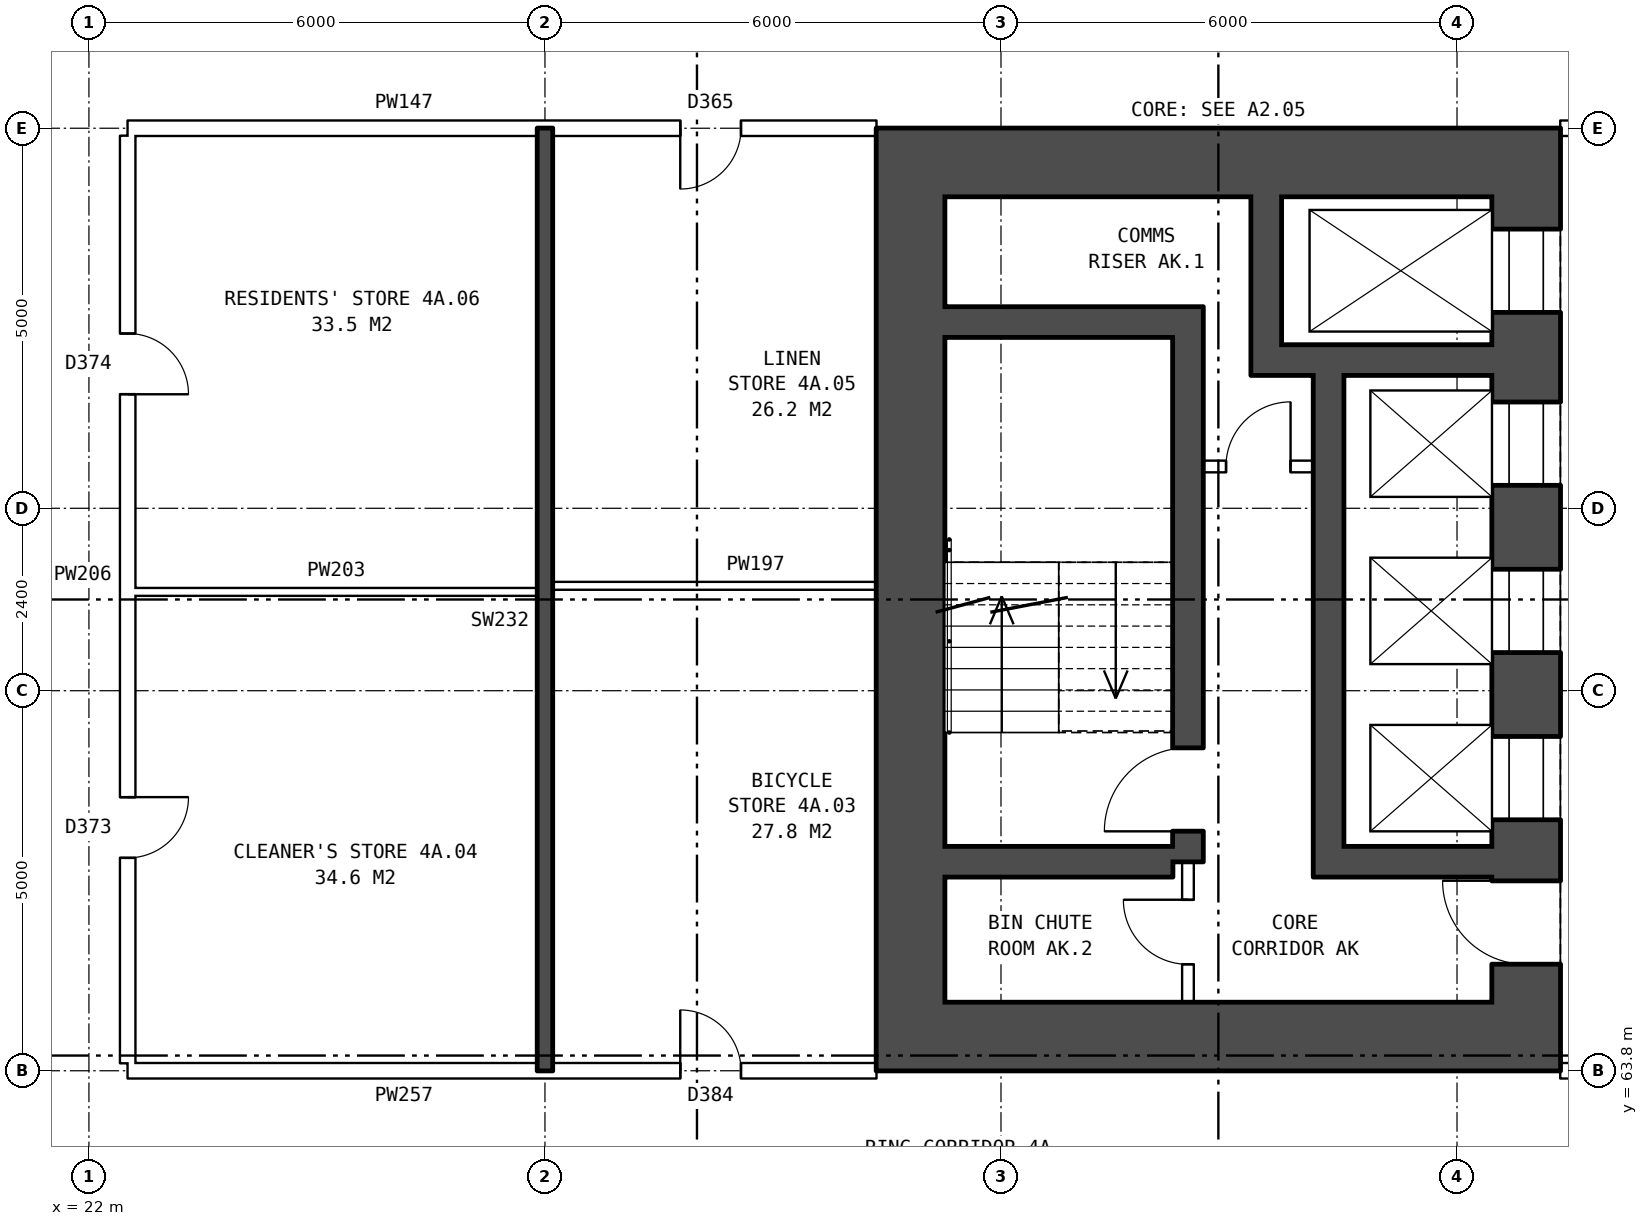
"""IFC4 building model, lengths in metres.
Left out: names, types, materials, properties, quantities, classifications, styles, units other than length and angle.
Written with IfcOpenShell. Run it as: python <this file> out.ifc"""

import sys

from ifc_helpers import new_model, si_unit, direction, frame, frame_2d, origin, place, context, subcontext, project, spatial, rectangle, extrude, element, fill, save


model = new_model("IFC4")
c1 = context("Model", 3, precision=1e-05, world=origin(), true_north=direction((0.0, 1.0)))
c2 = subcontext(c1, "Body", "Model", "MODEL_VIEW")
j1 = project(units=[si_unit("LENGTHUNIT", "METRE"), si_unit("PLANEANGLEUNIT", "RADIAN")], contexts=[c1])
p1 = place(None, origin())
s1 = spatial("IfcSite", under=j1, at=p1, CompositionType="ELEMENT")
p2 = place(p1, origin())
s2 = spatial("IfcBuilding", under=s1, at=p2, CompositionType="ELEMENT")
p3 = place(p2, frame((0.0, 0.0, 19.5)))
s3 = spatial("IfcBuildingStorey", under=s2, at=p3, CompositionType="ELEMENT", Elevation=19.5)
p4 = place(p3, frame((40.91, 75.3, 0.0), z_axis=(0.0, 0.0, 1.0), x_axis=(0.0, -1.0, 0.0)))
e1 = element("IfcWall", 1, at=p4, inside=s3, PredefinedType="SHEAR", context=c2, shape_type="SweptSolid", body=[
    extrude(rectangle(XDim=10.6, YDim=0.9, at=frame_2d((5.3, 0.0))), origin(), (0.0, 0.0, 1.0), 2.85),
])
p5 = place(p4, frame((0.425, 0.0, 0.0)))
e2 = element("IfcOpeningElement", 2, at=p5, cuts=e1, PredefinedType="OPENING", context=c2, shape_type="SweptSolid", body=[
    extrude(rectangle(XDim=1.1, YDim=2.1, at=frame_2d((0.55, 1.05))), frame((0.0, 0.46, 0.0), z_axis=(0.0, -1.0, 0.0), x_axis=(1.0, 0.0, 0.0)), (0.0, 0.0, 1.0), 0.92),
])
p6 = place(p4, frame((2.7, 0.0, 0.0)))
e3 = element("IfcOpeningElement", 3, at=p6, cuts=e1, PredefinedType="OPENING", context=c2, shape_type="SweptSolid", body=[
    extrude(rectangle(XDim=1.1, YDim=2.1, at=frame_2d((0.55, 1.05))), frame((0.0, 0.46, 0.0), z_axis=(0.0, -1.0, 0.0), x_axis=(1.0, 0.0, 0.0)), (0.0, 0.0, 1.0), 0.92),
])
p7 = place(p4, frame((4.9, 0.0, 0.0)))
e4 = element("IfcOpeningElement", 4, at=p7, cuts=e1, PredefinedType="OPENING", context=c2, shape_type="SweptSolid", body=[
    extrude(rectangle(XDim=1.1, YDim=2.1, at=frame_2d((0.55, 1.05))), frame((0.0, 0.46, 0.0), z_axis=(0.0, -1.0, 0.0), x_axis=(1.0, 0.0, 0.0)), (0.0, 0.0, 1.0), 0.92),
])
p8 = place(p4, frame((7.1, 0.0, 0.0)))
e5 = element("IfcOpeningElement", 5, at=p8, cuts=e1, PredefinedType="OPENING", context=c2, shape_type="SweptSolid", body=[
    extrude(rectangle(XDim=1.1, YDim=2.1, at=frame_2d((0.55, 1.05))), frame((0.0, 0.46, 0.0), z_axis=(0.0, -1.0, 0.0), x_axis=(1.0, 0.0, 0.0)), (0.0, 0.0, 1.0), 0.92),
])
p9 = place(p4, frame((9.0, 0.0, 0.0)))
e6 = element("IfcOpeningElement", 6, at=p9, cuts=e1, PredefinedType="OPENING", context=c2, shape_type="SweptSolid", body=[
    extrude(rectangle(XDim=1.1, YDim=2.1, at=frame_2d((0.55, 1.05))), frame((0.0, 0.46, 0.0), z_axis=(0.0, -1.0, 0.0), x_axis=(1.0, 0.0, 0.0)), (0.0, 0.0, 1.0), 0.92),
])
p10 = place(p3, frame((32.81, 75.3, 0.0), z_axis=(0.0, 0.0, 1.0), x_axis=(0.0, -1.0, 0.0)))
e7 = element("IfcWall", 7, at=p10, inside=s3, PredefinedType="SHEAR", context=c2, shape_type="SweptSolid", body=[
    extrude(rectangle(XDim=10.6, YDim=0.9, at=frame_2d((5.3, 0.0))), origin(), (0.0, 0.0, 1.0), 2.85),
])
for number, where, z_axis, x_axis in (
    (8, (41.36, 75.75, 0.0), (0.0, 0.0, 1.0), (-1.0, 0.0, 0.0)),
    (9, (41.36, 64.25, 0.0), (0.0, 0.0, 1.0), (-1.0, 0.0, 0.0)),
):
    element("IfcWall", number, at=place(p3, frame(where, z_axis=z_axis, x_axis=x_axis)), inside=s3, PredefinedType="SHEAR", context=c2, shape_type="SweptSolid", body=[
        extrude(rectangle(XDim=9.0, YDim=0.9, at=frame_2d((4.5, 0.0))), origin(), (0.0, 0.0, 1.0), 2.85),
    ])
p11 = place(p3, frame((36.26, 73.65, 0.0), z_axis=(0.0, 0.0, 1.0), x_axis=(-1.0, 0.0, 0.0)))
e10 = element("IfcWall", 10, at=p11, inside=s3, PredefinedType="SHEAR", context=c2, shape_type="SweptSolid", body=[
    extrude(rectangle(XDim=3.0, YDim=0.4, at=frame_2d((1.5, 0.0))), origin(), (0.0, 0.0, 1.0), 2.85),
])
p12 = place(p3, frame((40.46, 73.15, 0.0), z_axis=(0.0, 0.0, 1.0), x_axis=(-1.0, 0.0, 0.0)))
e11 = element("IfcWall", 11, at=p12, inside=s3, PredefinedType="SHEAR", context=c2, shape_type="SweptSolid", body=[
    extrude(rectangle(XDim=3.17, YDim=0.4, at=frame_2d((1.585, 0.0))), origin(), (0.0, 0.0, 1.0), 2.85),
])
p13 = place(p3, frame((38.11, 71.75, 0.0), z_axis=(0.0, 0.0, 1.0), x_axis=(-1.0, 0.0, 0.0)))
e12 = element("IfcWall", 12, at=p13, inside=s3, PredefinedType="PARTITIONING", context=c2, shape_type="SweptSolid", body=[
    extrude(rectangle(XDim=1.45, YDim=0.15, at=frame_2d((0.725, 0.0))), origin(), (0.0, 0.0, 1.0), 2.85),
])
p14 = place(p13, frame((0.3, 0.0, 0.0)))
e13 = element("IfcOpeningElement", 13, at=p14, cuts=e12, PredefinedType="OPENING", context=c2, shape_type="SweptSolid", body=[
    extrude(rectangle(XDim=0.85, YDim=2.1, at=frame_2d((0.425, 1.05))), frame((0.0, 0.085, 0.0), z_axis=(0.0, -1.0, 0.0), x_axis=(1.0, 0.0, 0.0)), (0.0, 0.0, 1.0), 0.17),
])
p15 = place(p3, frame((40.46, 66.55, 0.0), z_axis=(0.0, 0.0, 1.0), x_axis=(-1.0, 0.0, 0.0)))
e14 = element("IfcWall", 14, at=p15, inside=s3, PredefinedType="SHEAR", context=c2, shape_type="SweptSolid", body=[
    extrude(rectangle(XDim=1.95, YDim=0.4, at=frame_2d((0.975, 0.0))), origin(), (0.0, 0.0, 1.0), 2.85),
])
p16 = place(p3, frame((36.26, 66.55, 0.0), z_axis=(0.0, 0.0, 1.0), x_axis=(-1.0, 0.0, 0.0)))
e15 = element("IfcWall", 15, at=p16, inside=s3, PredefinedType="SHEAR", context=c2, shape_type="SweptSolid", body=[
    extrude(rectangle(XDim=3.0, YDim=0.4, at=frame_2d((1.5, 0.0))), origin(), (0.0, 0.0, 1.0), 2.85),
])
p17 = place(p3, frame((38.31, 72.95, 0.0), z_axis=(0.0, 0.0, 1.0), x_axis=(0.0, -1.0, 0.0)))
e16 = element("IfcWall", 16, at=p17, inside=s3, PredefinedType="SHEAR", context=c2, shape_type="SweptSolid", body=[
    extrude(rectangle(XDim=6.6, YDim=0.4, at=frame_2d((3.3, 0.0))), origin(), (0.0, 0.0, 1.0), 2.85),
])
p18 = place(p3, frame((37.49, 75.3, 0.0), z_axis=(0.0, 0.0, 1.0), x_axis=(0.0, -1.0, 0.0)))
e17 = element("IfcWall", 17, at=p18, inside=s3, PredefinedType="SHEAR", context=c2, shape_type="SweptSolid", body=[
    extrude(rectangle(XDim=1.95, YDim=0.4, at=frame_2d((0.975, 0.0))), origin(), (0.0, 0.0, 1.0), 2.85),
])
p19 = place(p3, frame((36.46, 73.85, 0.0), z_axis=(0.0, 0.0, 1.0), x_axis=(0.0, -1.0, 0.0)))
e18 = element("IfcWall", 18, at=p19, inside=s3, PredefinedType="SHEAR", context=c2, shape_type="SweptSolid", body=[
    extrude(rectangle(XDim=7.3, YDim=0.4, at=frame_2d((3.65, 0.0))), origin(), (0.0, 0.0, 1.0), 2.85),
])
p20 = place(p19, frame((5.8, 0.0, 0.0)))
e19 = element("IfcOpeningElement", 19, at=p20, cuts=e18, PredefinedType="OPENING", context=c2, shape_type="SweptSolid", body=[
    extrude(rectangle(XDim=1.1, YDim=2.1, at=frame_2d((0.55, 1.05))), frame((0.0, 0.21, 0.0), z_axis=(0.0, -1.0, 0.0), x_axis=(1.0, 0.0, 0.0)), (0.0, 0.0, 1.0), 0.42),
])
p21 = place(p3, frame((36.46, 66.55, 0.0), z_axis=(0.0, 0.0, 1.0), x_axis=(0.0, -1.0, 0.0)))
e20 = element("IfcWall", 20, at=p21, inside=s3, PredefinedType="PARTITIONING", context=c2, shape_type="SweptSolid", body=[
    extrude(rectangle(XDim=1.85, YDim=0.15, at=frame_2d((0.925, 0.0))), origin(), (0.0, 0.0, 1.0), 2.85),
])
p22 = place(p21, frame((0.5, 0.0, 0.0)))
e21 = element("IfcOpeningElement", 21, at=p22, cuts=e20, PredefinedType="OPENING", context=c2, shape_type="SweptSolid", body=[
    extrude(rectangle(XDim=0.85, YDim=2.1, at=frame_2d((0.425, 1.05))), frame((0.0, 0.085, 0.0), z_axis=(0.0, -1.0, 0.0), x_axis=(1.0, 0.0, 0.0)), (0.0, 0.0, 1.0), 0.17),
])
p23 = place(p3, frame((22.51, 63.8, 0.0), z_axis=(0.0, 0.0, 1.0), x_axis=(1.0, 0.0, 0.0)))
e22 = element("IfcWall", 22, at=p23, inside=s3, PredefinedType="PARTITIONING", context=c2, shape_type="SweptSolid", body=[
    extrude(rectangle(XDim=9.85, YDim=0.2, at=frame_2d((4.925, 0.0))), origin(), (0.0, 0.0, 1.0), 2.85),
])
p24 = place(p23, frame((7.27, 0.0, 0.0)))
e23 = element("IfcOpeningElement", 23, at=p24, cuts=e22, PredefinedType="OPENING", context=c2, shape_type="SweptSolid", body=[
    extrude(rectangle(XDim=0.8, YDim=2.1, at=frame_2d((0.4, 1.05))), frame((0.0, 0.11, 0.0), z_axis=(0.0, -1.0, 0.0), x_axis=(1.0, 0.0, 0.0)), (0.0, 0.0, 1.0), 0.22),
])
p25 = place(p3, frame((41.36, 63.8, 0.0), z_axis=(0.0, 0.0, 1.0), x_axis=(1.0, 0.0, 0.0)))
e24 = element("IfcWall", 24, at=p25, inside=s3, PredefinedType="PARTITIONING", context=c2, shape_type="SweptSolid", body=[
    extrude(rectangle(XDim=3.0, YDim=0.2, at=frame_2d((1.5, 0.0))), origin(), (0.0, 0.0, 1.0), 2.85),
])
p26 = place(p25, frame((1.0, 0.0, 0.0)))
e25 = element("IfcOpeningElement", 25, at=p26, cuts=e24, PredefinedType="OPENING", context=c2, shape_type="SweptSolid", body=[
    extrude(rectangle(XDim=1.0, YDim=2.1, at=frame_2d((0.5, 1.05))), frame((0.0, 0.11, 0.0), z_axis=(0.0, -1.0, 0.0), x_axis=(1.0, 0.0, 0.0)), (0.0, 0.0, 1.0), 0.22),
])
p27 = place(p3, frame((22.61, 70.1, 0.0), z_axis=(0.0, 0.0, 1.0), x_axis=(1.0, 0.0, 0.0)))
e26 = element("IfcWall", 26, at=p27, inside=s3, PredefinedType="PARTITIONING", context=c2, shape_type="SweptSolid", body=[
    extrude(rectangle(XDim=5.29, YDim=0.1, at=frame_2d((2.645, 0.0))), origin(), (0.0, 0.0, 1.0), 2.85),
])
p28 = place(p3, frame((28.1, 70.18, 0.0), z_axis=(0.0, 0.0, 1.0), x_axis=(1.0, 0.0, 0.0)))
e27 = element("IfcWall", 27, at=p28, inside=s3, PredefinedType="PARTITIONING", context=c2, shape_type="SweptSolid", body=[
    extrude(rectangle(XDim=4.26, YDim=0.1, at=frame_2d((2.13, 0.0))), origin(), (0.0, 0.0, 1.0), 2.85),
])
p29 = place(p3, frame((22.51, 76.2, 0.0), z_axis=(0.0, 0.0, 1.0), x_axis=(1.0, 0.0, 0.0)))
e28 = element("IfcWall", 28, at=p29, inside=s3, PredefinedType="PARTITIONING", context=c2, shape_type="SweptSolid", body=[
    extrude(rectangle(XDim=9.85, YDim=0.2, at=frame_2d((4.925, 0.0))), origin(), (0.0, 0.0, 1.0), 2.85),
])
p30 = place(p29, frame((7.27, 0.0, 0.0)))
e29 = element("IfcOpeningElement", 29, at=p30, cuts=e28, PredefinedType="OPENING", context=c2, shape_type="SweptSolid", body=[
    extrude(rectangle(XDim=0.8, YDim=2.1, at=frame_2d((0.4, 1.05))), frame((0.0, 0.11, 0.0), z_axis=(0.0, -1.0, 0.0), x_axis=(1.0, 0.0, 0.0)), (0.0, 0.0, 1.0), 0.22),
])
p31 = place(p3, frame((41.36, 76.2, 0.0), z_axis=(0.0, 0.0, 1.0), x_axis=(1.0, 0.0, 0.0)))
e30 = element("IfcWall", 30, at=p31, inside=s3, PredefinedType="PARTITIONING", context=c2, shape_type="SweptSolid", body=[
    extrude(rectangle(XDim=3.0, YDim=0.2, at=frame_2d((1.5, 0.0))), origin(), (0.0, 0.0, 1.0), 2.85),
])
p32 = place(p31, frame((1.0, 0.0, 0.0)))
e31 = element("IfcOpeningElement", 31, at=p32, cuts=e30, PredefinedType="OPENING", context=c2, shape_type="SweptSolid", body=[
    extrude(rectangle(XDim=1.0, YDim=2.1, at=frame_2d((0.5, 1.05))), frame((0.0, 0.11, 0.0), z_axis=(0.0, -1.0, 0.0), x_axis=(1.0, 0.0, 0.0)), (0.0, 0.0, 1.0), 0.22),
])
p33 = place(p3, frame((22.51, 63.9, 0.0), z_axis=(0.0, 0.0, 1.0), x_axis=(0.0, 1.0, 0.0)))
e32 = element("IfcWall", 32, at=p33, inside=s3, PredefinedType="PARTITIONING", context=c2, shape_type="SweptSolid", body=[
    extrude(rectangle(XDim=12.2, YDim=0.2, at=frame_2d((6.1, 0.0))), origin(), (0.0, 0.0, 1.0), 2.85),
])
p34 = place(p33, frame((2.7, 0.0, 0.0)))
e33 = element("IfcOpeningElement", 33, at=p34, cuts=e32, PredefinedType="OPENING", context=c2, shape_type="SweptSolid", body=[
    extrude(rectangle(XDim=0.8, YDim=2.1, at=frame_2d((0.4, 1.05))), frame((0.0, 0.11, 0.0), z_axis=(0.0, -1.0, 0.0), x_axis=(1.0, 0.0, 0.0)), (0.0, 0.0, 1.0), 0.22),
])
p35 = place(p33, frame((8.8, 0.0, 0.0)))
e34 = element("IfcOpeningElement", 34, at=p35, cuts=e32, PredefinedType="OPENING", context=c2, shape_type="SweptSolid", body=[
    extrude(rectangle(XDim=0.8, YDim=2.1, at=frame_2d((0.4, 1.05))), frame((0.0, 0.11, 0.0), z_axis=(0.0, -1.0, 0.0), x_axis=(1.0, 0.0, 0.0)), (0.0, 0.0, 1.0), 0.22),
])
p36 = place(p3, frame((28.0, 63.8, 0.0), z_axis=(0.0, 0.0, 1.0), x_axis=(0.0, 1.0, 0.0)))
e35 = element("IfcWall", 35, at=p36, inside=s3, PredefinedType="SOLIDWALL", context=c2, shape_type="SweptSolid", body=[
    extrude(rectangle(XDim=12.4, YDim=0.2, at=frame_2d((6.2, 0.0))), origin(), (0.0, 0.0, 1.0), 2.85),
])
p37 = place(p5, origin())
e36 = element("IfcDoor", 36, at=p37, inside=s3, OperationType="DOUBLE_DOOR_SLIDING", PredefinedType="DOOR", context=c2, shape_type="SweptSolid", body=[
    extrude(rectangle(XDim=1.1, YDim=2.1, at=frame_2d((0.55, 1.05))), frame((0.0, -0.385, 0.0), z_axis=(0.0, -1.0, 0.0), x_axis=(1.0, 0.0, 0.0)), (0.0, 0.0, 1.0), 0.05),
])
fill(e2, e36)
p38 = place(p6, origin())
e37 = element("IfcDoor", 37, at=p38, inside=s3, OperationType="DOUBLE_DOOR_SLIDING", PredefinedType="DOOR", context=c2, shape_type="SweptSolid", body=[
    extrude(rectangle(XDim=1.1, YDim=2.1, at=frame_2d((0.55, 1.05))), frame((0.0, -0.385, 0.0), z_axis=(0.0, -1.0, 0.0), x_axis=(1.0, 0.0, 0.0)), (0.0, 0.0, 1.0), 0.05),
])
fill(e3, e37)
p39 = place(p7, origin())
e38 = element("IfcDoor", 38, at=p39, inside=s3, OperationType="DOUBLE_DOOR_SLIDING", PredefinedType="DOOR", context=c2, shape_type="SweptSolid", body=[
    extrude(rectangle(XDim=1.1, YDim=2.1, at=frame_2d((0.55, 1.05))), frame((0.0, -0.385, 0.0), z_axis=(0.0, -1.0, 0.0), x_axis=(1.0, 0.0, 0.0)), (0.0, 0.0, 1.0), 0.05),
])
fill(e4, e38)
p40 = place(p8, origin())
e39 = element("IfcDoor", 39, at=p40, inside=s3, OperationType="DOUBLE_DOOR_SLIDING", PredefinedType="DOOR", context=c2, shape_type="SweptSolid", body=[
    extrude(rectangle(XDim=1.1, YDim=2.1, at=frame_2d((0.55, 1.05))), frame((0.0, -0.385, 0.0), z_axis=(0.0, -1.0, 0.0), x_axis=(1.0, 0.0, 0.0)), (0.0, 0.0, 1.0), 0.05),
])
fill(e5, e39)
p41 = place(p9, frame((1.1, 0.0, 0.0), z_axis=(0.0, 0.0, 1.0), x_axis=(-1.0, 0.0, 0.0)))
e40 = element("IfcDoor", 40, at=p41, inside=s3, OperationType="SINGLE_SWING_RIGHT", PredefinedType="DOOR", context=c2, shape_type="SweptSolid", body=[
    extrude(rectangle(XDim=1.1, YDim=2.1, at=frame_2d((0.55, 1.05))), frame((0.0, 0.435, 0.0), z_axis=(0.0, -1.0, 0.0), x_axis=(1.0, 0.0, 0.0)), (0.0, 0.0, 1.0), 0.05),
])
fill(e6, e40)
p42 = place(p20, frame((1.1, 0.0, 0.0), z_axis=(0.0, 0.0, 1.0), x_axis=(-1.0, 0.0, 0.0)))
e41 = element("IfcDoor", 41, at=p42, inside=s3, OperationType="SINGLE_SWING_LEFT", PredefinedType="DOOR", context=c2, shape_type="SweptSolid", body=[
    extrude(rectangle(XDim=1.1, YDim=2.1, at=frame_2d((0.55, 1.05))), frame((0.0, 0.025, 0.0), z_axis=(0.0, -1.0, 0.0), x_axis=(1.0, 0.0, 0.0)), (0.0, 0.0, 1.0), 0.05),
])
fill(e19, e41)
p43 = place(p14, frame((0.85, 0.0, 0.0), z_axis=(0.0, 0.0, 1.0), x_axis=(-1.0, 0.0, 0.0)))
e42 = element("IfcDoor", 42, at=p43, inside=s3, OperationType="SINGLE_SWING_RIGHT", PredefinedType="DOOR", context=c2, shape_type="SweptSolid", body=[
    extrude(rectangle(XDim=0.85, YDim=2.1, at=frame_2d((0.425, 1.05))), frame((0.0, 0.025, 0.0), z_axis=(0.0, -1.0, 0.0), x_axis=(1.0, 0.0, 0.0)), (0.0, 0.0, 1.0), 0.05),
])
fill(e13, e42)
p44 = place(p22, frame((0.85, 0.0, 0.0), z_axis=(0.0, 0.0, 1.0), x_axis=(-1.0, 0.0, 0.0)))
e43 = element("IfcDoor", 43, at=p44, inside=s3, OperationType="SINGLE_SWING_RIGHT", PredefinedType="DOOR", context=c2, shape_type="SweptSolid", body=[
    extrude(rectangle(XDim=0.85, YDim=2.1, at=frame_2d((0.425, 1.05))), frame((0.0, 0.025, 0.0), z_axis=(0.0, -1.0, 0.0), x_axis=(1.0, 0.0, 0.0)), (0.0, 0.0, 1.0), 0.05),
])
fill(e21, e43)
p45 = place(p24, origin())
e44 = element("IfcDoor", 44, at=p45, inside=s3, OperationType="SINGLE_SWING_LEFT", PredefinedType="DOOR", context=c2, shape_type="SweptSolid", body=[
    extrude(rectangle(XDim=0.8, YDim=2.1, at=frame_2d((0.4, 1.05))), frame((0.0, 0.025, 0.0), z_axis=(0.0, -1.0, 0.0), x_axis=(1.0, 0.0, 0.0)), (0.0, 0.0, 1.0), 0.05),
])
fill(e23, e44)
p46 = place(p34, frame((0.8, 0.0, 0.0), z_axis=(0.0, 0.0, 1.0), x_axis=(-1.0, 0.0, 0.0)))
e45 = element("IfcDoor", 45, at=p46, inside=s3, OperationType="SINGLE_SWING_LEFT", PredefinedType="DOOR", context=c2, shape_type="SweptSolid", body=[
    extrude(rectangle(XDim=0.8, YDim=2.1, at=frame_2d((0.4, 1.05))), frame((0.0, 0.025, 0.0), z_axis=(0.0, -1.0, 0.0), x_axis=(1.0, 0.0, 0.0)), (0.0, 0.0, 1.0), 0.05),
])
fill(e33, e45)
p47 = place(p30, frame((0.8, 0.0, 0.0), z_axis=(0.0, 0.0, 1.0), x_axis=(-1.0, 0.0, 0.0)))
e46 = element("IfcDoor", 46, at=p47, inside=s3, OperationType="SINGLE_SWING_RIGHT", PredefinedType="DOOR", context=c2, shape_type="SweptSolid", body=[
    extrude(rectangle(XDim=0.8, YDim=2.1, at=frame_2d((0.4, 1.05))), frame((0.0, 0.025, 0.0), z_axis=(0.0, -1.0, 0.0), x_axis=(1.0, 0.0, 0.0)), (0.0, 0.0, 1.0), 0.05),
])
fill(e29, e46)
p48 = place(p35, frame((0.8, 0.0, 0.0), z_axis=(0.0, 0.0, 1.0), x_axis=(-1.0, 0.0, 0.0)))
e47 = element("IfcDoor", 47, at=p48, inside=s3, OperationType="SINGLE_SWING_RIGHT", PredefinedType="DOOR", context=c2, shape_type="SweptSolid", body=[
    extrude(rectangle(XDim=0.8, YDim=2.1, at=frame_2d((0.4, 1.05))), frame((0.0, 0.025, 0.0), z_axis=(0.0, -1.0, 0.0), x_axis=(1.0, 0.0, 0.0)), (0.0, 0.0, 1.0), 0.05),
])
fill(e34, e47)
save(model, sys.argv[1])
